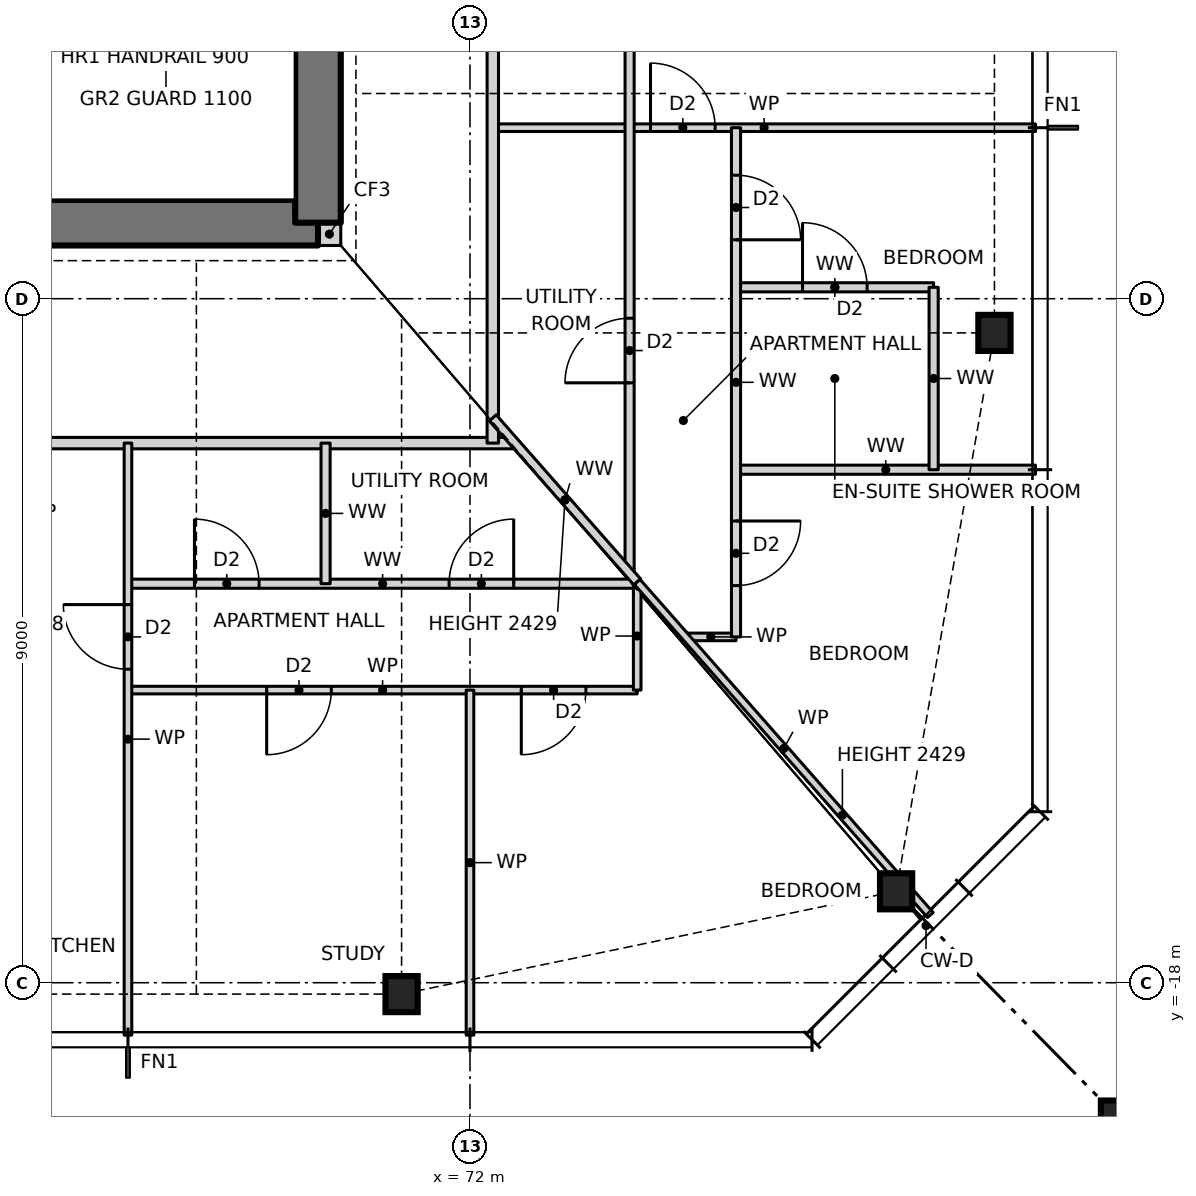
"""IFC4 building model, lengths in metres.
Left out: names, types, materials, properties, quantities, classifications, styles, units other than length and angle.
Written with IfcOpenShell. Run it as: python <this file> out.ifc"""

import sys

from ifc_helpers import new_model, si_unit, direction, frame, frame_2d, origin, origin_2d, place, context, subcontext, project, spatial, rectangle, hollow_rectangle, i_section, extrude, element, fill, save


model = new_model("IFC4")
c1 = context("Model", 3, precision=1e-05, world=origin(), true_north=direction((0.0, 1.0)))
c2 = subcontext(c1, "Body", "Model", "MODEL_VIEW")
j1 = project(units=[si_unit("LENGTHUNIT", "METRE"), si_unit("PLANEANGLEUNIT", "RADIAN")], contexts=[c1])
p1 = place(None, origin())
s1 = spatial("IfcSite", under=j1, at=p1, CompositionType="ELEMENT")
p2 = place(p1, origin())
s2 = spatial("IfcBuilding", under=s1, at=p2, CompositionType="ELEMENT")
p3 = place(p2, frame((0.0, 0.0, 57.0)))
s3 = spatial("IfcBuildingStorey", under=s2, at=p3, CompositionType="ELEMENT", Elevation=57.0)
for number, where, z_axis, x_axis in (
    (1, (71.1, -18.15, 0.0), (0.0, 0.0, 1.0), (1.0, 0.0, 0.0)),
    (2, (77.606, -16.797, 0.0), (0.0, 0.0, 1.0), (1.0, 0.0, 0.0)),
    (3, (78.9, -9.45, 0.0), (0.0, 0.0, 1.0), (1.0, 0.0, 0.0)),
):
    element("IfcColumn", number, at=place(p3, frame(where, z_axis=z_axis, x_axis=x_axis)), inside=s3, PredefinedType="COLUMN", context=c2, shape_type="SweptSolid", body=[
        extrude(i_section(OverallWidth=0.424, OverallDepth=0.475, WebThickness=0.048, FlangeThickness=0.077, at=origin_2d()), origin(), (0.0, 0.0, 1.0), 3.5),
    ])
p4 = place(p3, frame((80.9, -20.15, 0.0), z_axis=(0.0, 0.0, 1.0), x_axis=(1.0, 0.0, 0.0)))
e4 = element("IfcColumn", 4, at=p4, inside=s3, PredefinedType="COLUMN", context=c2, shape_type="SweptSolid", body=[
    extrude(hollow_rectangle(XDim=1.2, YDim=1.2, WallThickness=0.07, at=origin_2d()), origin(), (0.0, 0.0, 1.0), 3.5),
])
p5 = place(p3, frame((70.0, -8.15, 0.0), z_axis=(0.0, 0.0, 1.0), x_axis=(1.0, 0.0, 0.0)))
e5 = element("IfcWall", 5, at=p5, inside=s3, PredefinedType="SOLIDWALL", context=c2, shape_type="SweptSolid", body=[
    extrude(rectangle(XDim=0.3, YDim=0.3, at=frame_2d((0.15, 0.0))), origin(), (0.0, 0.0, 1.0), 3.5),
])
p6 = place(p3, frame((56.0, -8.0, 0.0), z_axis=(0.0, 0.0, 1.0), x_axis=(1.0, 0.0, 0.0)))
e6 = element("IfcWall", 6, at=p6, inside=s3, PredefinedType="SHEAR", context=c2, shape_type="SweptSolid", body=[
    extrude(rectangle(XDim=14.0, YDim=0.6, at=frame_2d((7.0, 0.0))), origin(), (0.0, 0.0, 1.0), 3.5),
])
p7 = place(p6, frame((2.7, 0.0, 0.0)))
e7 = element("IfcOpeningElement", 7, at=p7, cuts=e6, PredefinedType="OPENING", context=c2, shape_type="SweptSolid", body=[
    extrude(rectangle(XDim=0.9, YDim=2.1, at=frame_2d((0.45, 1.05))), frame((0.0, 0.31, 0.0), z_axis=(0.0, -1.0, 0.0), x_axis=(1.0, 0.0, 0.0)), (0.0, 0.0, 1.0), 0.62),
])
p8 = place(p6, frame((7.7, 0.0, 0.0)))
e8 = element("IfcOpeningElement", 8, at=p8, cuts=e6, PredefinedType="OPENING", context=c2, shape_type="SweptSolid", body=[
    extrude(rectangle(XDim=0.9, YDim=2.1, at=frame_2d((0.45, 1.05))), frame((0.0, 0.31, 0.0), z_axis=(0.0, -1.0, 0.0), x_axis=(1.0, 0.0, 0.0)), (0.0, 0.0, 1.0), 0.62),
])
p9 = place(p3, frame((70.0, -8.0, 0.0), z_axis=(0.0, 0.0, 1.0), x_axis=(0.0, 1.0, 0.0)))
e9 = element("IfcWall", 9, at=p9, inside=s3, PredefinedType="SHEAR", context=c2, shape_type="SweptSolid", body=[
    extrude(rectangle(XDim=16.0, YDim=0.6, at=frame_2d((8.0, 0.0))), origin(), (0.0, 0.0, 1.0), 3.5),
])
p10 = place(p9, frame((7.5, 0.0, 0.0)))
e10 = element("IfcOpeningElement", 10, at=p10, cuts=e9, PredefinedType="OPENING", context=c2, shape_type="SweptSolid", body=[
    extrude(rectangle(XDim=1.0, YDim=2.1, at=frame_2d((0.5, 1.05))), frame((0.0, 0.31, 0.0), z_axis=(0.0, -1.0, 0.0), x_axis=(1.0, 0.0, 0.0)), (0.0, 0.0, 1.0), 0.62),
])
p11 = place(p3, frame((67.5, -14.15, 0.0), z_axis=(0.0, 0.0, 1.0), x_axis=(1.0, 0.0, 0.0)))
e11 = element("IfcWall", 11, at=p11, inside=s3, PredefinedType="PARTITIONING", context=c2, shape_type="SweptSolid", body=[
    extrude(rectangle(XDim=6.7, YDim=0.1, at=frame_2d((3.35, 0.0))), origin(), (0.0, 0.0, 1.0), 3.27),
])
p12 = place(p11, frame((1.825, 0.0, 0.0)))
e12 = element("IfcOpeningElement", 12, at=p12, cuts=e11, PredefinedType="OPENING", context=c2, shape_type="SweptSolid", body=[
    extrude(rectangle(XDim=0.85, YDim=2.1, at=frame_2d((0.425, 1.05))), frame((0.0, 0.06, 0.0), z_axis=(0.0, -1.0, 0.0), x_axis=(1.0, 0.0, 0.0)), (0.0, 0.0, 1.0), 0.12),
])
p13 = place(p11, frame((5.175, 0.0, 0.0)))
e13 = element("IfcOpeningElement", 13, at=p13, cuts=e11, PredefinedType="OPENING", context=c2, shape_type="SweptSolid", body=[
    extrude(rectangle(XDim=0.85, YDim=2.1, at=frame_2d((0.425, 1.05))), frame((0.0, 0.06, 0.0), z_axis=(0.0, -1.0, 0.0), x_axis=(1.0, 0.0, 0.0)), (0.0, 0.0, 1.0), 0.12),
])
p14 = place(p3, frame((74.836, -13.45, 0.0), z_axis=(0.0, 0.0, 1.0), x_axis=(1.0, 0.0, 0.0)))
e14 = element("IfcWall", 14, at=p14, inside=s3, PredefinedType="PARTITIONING", context=c2, shape_type="SweptSolid", body=[
    extrude(rectangle(XDim=0.664, YDim=0.1, at=frame_2d((0.332, 0.0))), origin(), (0.0, 0.0, 1.0), 3.27),
])
p15 = place(p3, frame((67.5, -12.75, 0.0), z_axis=(0.0, 0.0, 1.0), x_axis=(1.0, 0.0, 0.0)))
e15 = element("IfcWall", 15, at=p15, inside=s3, PredefinedType="PARTITIONING", context=c2, shape_type="SweptSolid", body=[
    extrude(rectangle(XDim=6.7, YDim=0.12, at=frame_2d((3.35, 0.0))), origin(), (0.0, 0.0, 1.0), 3.27),
])
p16 = place(p15, frame((0.875, 0.0, 0.0)))
e16 = element("IfcOpeningElement", 16, at=p16, cuts=e15, PredefinedType="OPENING", context=c2, shape_type="SweptSolid", body=[
    extrude(rectangle(XDim=0.85, YDim=2.1, at=frame_2d((0.425, 1.05))), frame((0.0, 0.07, 0.0), z_axis=(0.0, -1.0, 0.0), x_axis=(1.0, 0.0, 0.0)), (0.0, 0.0, 1.0), 0.14),
])
p17 = place(p15, frame((4.225, 0.0, 0.0)))
e17 = element("IfcOpeningElement", 17, at=p17, cuts=e15, PredefinedType="OPENING", context=c2, shape_type="SweptSolid", body=[
    extrude(rectangle(XDim=0.85, YDim=2.1, at=frame_2d((0.425, 1.05))), frame((0.0, 0.07, 0.0), z_axis=(0.0, -1.0, 0.0), x_axis=(1.0, 0.0, 0.0)), (0.0, 0.0, 1.0), 0.14),
])
p18 = place(p3, frame((75.5, -11.25, 0.0), z_axis=(0.0, 0.0, 1.0), x_axis=(1.0, 0.0, 0.0)))
e18 = element("IfcWall", 18, at=p18, inside=s3, PredefinedType="PARTITIONING", context=c2, shape_type="SweptSolid", body=[
    extrude(rectangle(XDim=3.94, YDim=0.12, at=frame_2d((1.97, 0.0))), origin(), (0.0, 0.0, 1.0), 3.27),
])
p19 = place(p3, frame((53.408, -10.9, 0.0), z_axis=(0.0, 0.0, 1.0), x_axis=(1.0, 0.0, 0.0)))
e19 = element("IfcWall", 19, at=p19, inside=s3, PredefinedType="PARTITIONING", context=c2, shape_type="SweptSolid", body=[
    extrude(rectangle(XDim=19.184, YDim=0.15, at=frame_2d((9.592, 0.0))), origin(), (0.0, 0.0, 1.0), 3.27),
])
p20 = place(p19, frame((5.092, 0.0, 0.0)))
e20 = element("IfcOpeningElement", 20, at=p20, cuts=e19, PredefinedType="OPENING", context=c2, shape_type="SweptSolid", body=[
    extrude(rectangle(XDim=1.0, YDim=2.1, at=frame_2d((0.5, 1.05))), frame((0.0, 0.085, 0.0), z_axis=(0.0, -1.0, 0.0), x_axis=(1.0, 0.0, 0.0)), (0.0, 0.0, 1.0), 0.17),
])
p21 = place(p19, frame((10.492, 0.0, 0.0)))
e21 = element("IfcOpeningElement", 21, at=p21, cuts=e19, PredefinedType="OPENING", context=c2, shape_type="SweptSolid", body=[
    extrude(rectangle(XDim=1.0, YDim=2.1, at=frame_2d((0.5, 1.05))), frame((0.0, 0.085, 0.0), z_axis=(0.0, -1.0, 0.0), x_axis=(1.0, 0.0, 0.0)), (0.0, 0.0, 1.0), 0.17),
])
p22 = place(p3, frame((75.5, -8.85, 0.0), z_axis=(0.0, 0.0, 1.0), x_axis=(1.0, 0.0, 0.0)))
e22 = element("IfcWall", 22, at=p22, inside=s3, PredefinedType="PARTITIONING", context=c2, shape_type="SweptSolid", body=[
    extrude(rectangle(XDim=2.6, YDim=0.12, at=frame_2d((1.3, 0.0))), origin(), (0.0, 0.0, 1.0), 3.27),
])
p23 = place(p22, frame((0.875, 0.0, 0.0)))
e23 = element("IfcOpeningElement", 23, at=p23, cuts=e22, PredefinedType="OPENING", context=c2, shape_type="SweptSolid", body=[
    extrude(rectangle(XDim=0.85, YDim=2.1, at=frame_2d((0.425, 1.05))), frame((0.0, 0.07, 0.0), z_axis=(0.0, -1.0, 0.0), x_axis=(1.0, 0.0, 0.0)), (0.0, 0.0, 1.0), 0.14),
])
p24 = place(p3, frame((72.3, -6.75, 0.0), z_axis=(0.0, 0.0, 1.0), x_axis=(1.0, 0.0, 0.0)))
e24 = element("IfcWall", 24, at=p24, inside=s3, PredefinedType="PARTITIONING", context=c2, shape_type="SweptSolid", body=[
    extrude(rectangle(XDim=7.14, YDim=0.1, at=frame_2d((3.57, 0.0))), origin(), (0.0, 0.0, 1.0), 3.27),
])
p25 = place(p24, frame((2.075, 0.0, 0.0)))
e25 = element("IfcOpeningElement", 25, at=p25, cuts=e24, PredefinedType="OPENING", context=c2, shape_type="SweptSolid", body=[
    extrude(rectangle(XDim=0.85, YDim=2.1, at=frame_2d((0.425, 1.05))), frame((0.0, 0.06, 0.0), z_axis=(0.0, -1.0, 0.0), x_axis=(1.0, 0.0, 0.0)), (0.0, 0.0, 1.0), 0.12),
])
p26 = place(p3, frame((78.1, -11.25, 0.0), z_axis=(0.0, 0.0, 1.0), x_axis=(0.0, 1.0, 0.0)))
e26 = element("IfcWall", 26, at=p26, inside=s3, PredefinedType="PARTITIONING", context=c2, shape_type="SweptSolid", body=[
    extrude(rectangle(XDim=2.4, YDim=0.12, at=frame_2d((1.2, 0.0))), origin(), (0.0, 0.0, 1.0), 3.27),
])
p27 = place(p3, frame((75.5, -13.45, 0.0), z_axis=(0.0, 0.0, 1.0), x_axis=(0.0, 1.0, 0.0)))
e27 = element("IfcWall", 27, at=p27, inside=s3, PredefinedType="PARTITIONING", context=c2, shape_type="SweptSolid", body=[
    extrude(rectangle(XDim=6.7, YDim=0.12, at=frame_2d((3.35, 0.0))), origin(), (0.0, 0.0, 1.0), 3.27),
])
p28 = place(p27, frame((5.225, 0.0, 0.0)))
e28 = element("IfcOpeningElement", 28, at=p28, cuts=e27, PredefinedType="OPENING", context=c2, shape_type="SweptSolid", body=[
    extrude(rectangle(XDim=0.85, YDim=2.1, at=frame_2d((0.425, 1.05))), frame((0.0, 0.07, 0.0), z_axis=(0.0, -1.0, 0.0), x_axis=(1.0, 0.0, 0.0)), (0.0, 0.0, 1.0), 0.14),
])
p29 = place(p27, frame((0.675, 0.0, 0.0)))
e29 = element("IfcOpeningElement", 29, at=p29, cuts=e27, PredefinedType="OPENING", context=c2, shape_type="SweptSolid", body=[
    extrude(rectangle(XDim=0.85, YDim=2.1, at=frame_2d((0.425, 1.05))), frame((0.0, 0.07, 0.0), z_axis=(0.0, -1.0, 0.0), x_axis=(1.0, 0.0, 0.0)), (0.0, 0.0, 1.0), 0.14),
])
p30 = place(p3, frame((74.2, -14.15, 0.0), z_axis=(0.0, 0.0, 1.0), x_axis=(0.0, 1.0, 0.0)))
e30 = element("IfcWall", 30, at=p30, inside=s3, PredefinedType="PARTITIONING", context=c2, shape_type="SweptSolid", body=[
    extrude(rectangle(XDim=1.423, YDim=0.1, at=frame_2d((0.711, 0.0))), origin(), (0.0, 0.0, 1.0), 3.27),
])
p31 = place(p3, frame((74.1, -12.614, 0.0), z_axis=(0.0, 0.0, 1.0), x_axis=(0.0, 1.0, 0.0)))
e31 = element("IfcWall", 31, at=p31, inside=s3, PredefinedType="PARTITIONING", context=c2, shape_type="SweptSolid", body=[
    extrude(rectangle(XDim=25.228, YDim=0.12, at=frame_2d((12.614, 0.0))), origin(), (0.0, 0.0, 1.0), 3.27),
])
p32 = place(p31, frame((7.239, 0.0, 0.0)))
e32 = element("IfcOpeningElement", 32, at=p32, cuts=e31, PredefinedType="OPENING", context=c2, shape_type="SweptSolid", body=[
    extrude(rectangle(XDim=0.85, YDim=2.1, at=frame_2d((0.425, 1.05))), frame((0.0, 0.07, 0.0), z_axis=(0.0, -1.0, 0.0), x_axis=(1.0, 0.0, 0.0)), (0.0, 0.0, 1.0), 0.14),
])
p33 = place(p31, frame((10.439, 0.0, 0.0)))
e33 = element("IfcOpeningElement", 33, at=p33, cuts=e31, PredefinedType="OPENING", context=c2, shape_type="SweptSolid", body=[
    extrude(rectangle(XDim=0.85, YDim=2.1, at=frame_2d((0.425, 1.05))), frame((0.0, 0.07, 0.0), z_axis=(0.0, -1.0, 0.0), x_axis=(1.0, 0.0, 0.0)), (0.0, 0.0, 1.0), 0.14),
])
p34 = place(p31, frame((2.507, 0.0, 0.0)))
e34 = element("IfcOpeningElement", 34, at=p34, cuts=e31, PredefinedType="OPENING", context=c2, shape_type="SweptSolid", body=[
    extrude(rectangle(XDim=0.85, YDim=2.1, at=frame_2d((0.425, 1.05))), frame((0.0, 0.07, 0.0), z_axis=(0.0, -1.0, 0.0), x_axis=(1.0, 0.0, 0.0)), (0.0, 0.0, 1.0), 0.14),
])
p35 = place(p31, frame((16.639, 0.0, 0.0)))
e35 = element("IfcOpeningElement", 35, at=p35, cuts=e31, PredefinedType="OPENING", context=c2, shape_type="SweptSolid", body=[
    extrude(rectangle(XDim=0.85, YDim=2.1, at=frame_2d((0.425, 1.05))), frame((0.0, 0.07, 0.0), z_axis=(0.0, -1.0, 0.0), x_axis=(1.0, 0.0, 0.0)), (0.0, 0.0, 1.0), 0.14),
])
p36 = place(p31, frame((21.821, 0.0, 0.0)))
e36 = element("IfcOpeningElement", 36, at=p36, cuts=e31, PredefinedType="OPENING", context=c2, shape_type="SweptSolid", body=[
    extrude(rectangle(XDim=0.85, YDim=2.1, at=frame_2d((0.425, 1.05))), frame((0.0, 0.07, 0.0), z_axis=(0.0, -1.0, 0.0), x_axis=(1.0, 0.0, 0.0)), (0.0, 0.0, 1.0), 0.14),
])
p37 = place(p3, frame((72.3, -10.9, 0.0), z_axis=(0.0, 0.0, 1.0), x_axis=(0.0, 1.0, 0.0)))
e37 = element("IfcWall", 37, at=p37, inside=s3, PredefinedType="PARTITIONING", context=c2, shape_type="SweptSolid", body=[
    extrude(rectangle(XDim=21.468, YDim=0.15, at=frame_2d((10.734, 0.0))), origin(), (0.0, 0.0, 1.0), 3.27),
])
p38 = place(p37, frame((8.65, 0.0, 0.0)))
e38 = element("IfcOpeningElement", 38, at=p38, cuts=e37, PredefinedType="OPENING", context=c2, shape_type="SweptSolid", body=[
    extrude(rectangle(XDim=1.0, YDim=2.1, at=frame_2d((0.5, 1.05))), frame((0.0, 0.085, 0.0), z_axis=(0.0, -1.0, 0.0), x_axis=(1.0, 0.0, 0.0)), (0.0, 0.0, 1.0), 0.17),
])
p39 = place(p3, frame((72.0, -18.69, 0.0), z_axis=(0.0, 0.0, 1.0), x_axis=(0.0, 1.0, 0.0)))
e39 = element("IfcWall", 39, at=p39, inside=s3, PredefinedType="PARTITIONING", context=c2, shape_type="SweptSolid", body=[
    extrude(rectangle(XDim=4.54, YDim=0.1, at=frame_2d((2.27, 0.0))), origin(), (0.0, 0.0, 1.0), 3.27),
])
p40 = place(p3, frame((70.1, -12.75, 0.0), z_axis=(0.0, 0.0, 1.0), x_axis=(0.0, 1.0, 0.0)))
e40 = element("IfcWall", 40, at=p40, inside=s3, PredefinedType="PARTITIONING", context=c2, shape_type="SweptSolid", body=[
    extrude(rectangle(XDim=1.85, YDim=0.12, at=frame_2d((0.925, 0.0))), origin(), (0.0, 0.0, 1.0), 3.27),
])
p41 = place(p3, frame((67.5, -18.69, 0.0), z_axis=(0.0, 0.0, 1.0), x_axis=(0.0, 1.0, 0.0)))
e41 = element("IfcWall", 41, at=p41, inside=s3, PredefinedType="PARTITIONING", context=c2, shape_type="SweptSolid", body=[
    extrude(rectangle(XDim=7.79, YDim=0.1, at=frame_2d((3.895, 0.0))), origin(), (0.0, 0.0, 1.0), 3.27),
])
p42 = place(p41, frame((4.815, 0.0, 0.0)))
e42 = element("IfcOpeningElement", 42, at=p42, cuts=e41, PredefinedType="OPENING", context=c2, shape_type="SweptSolid", body=[
    extrude(rectangle(XDim=0.85, YDim=2.1, at=frame_2d((0.425, 1.05))), frame((0.0, 0.06, 0.0), z_axis=(0.0, -1.0, 0.0), x_axis=(1.0, 0.0, 0.0)), (0.0, 0.0, 1.0), 0.12),
])
p43 = place(p3, frame((74.2, -12.727, 0.0), z_axis=(0.0, 0.0, 1.0), x_axis=(-0.66059344937, 0.75074382758, 0.0)))
e43 = element("IfcWall", 43, at=p43, inside=s3, PredefinedType="PARTITIONING", context=c2, shape_type="SweptSolid", body=[
    extrude(rectangle(XDim=2.876, YDim=0.12, at=frame_2d((1.438, 0.0))), origin(), (0.0, 0.0, 1.0), 2.429),
])
p44 = place(p3, frame((78.057, -17.109, 0.0), z_axis=(0.0, 0.0, 1.0), x_axis=(-0.660654290516, 0.750690287951, 0.0)))
e44 = element("IfcWall", 44, at=p44, inside=s3, PredefinedType="PARTITIONING", context=c2, shape_type="SweptSolid", body=[
    extrude(rectangle(XDim=5.838, YDim=0.1, at=frame_2d((2.919, 0.0))), origin(), (0.0, 0.0, 1.0), 2.429),
])
p45 = place(p42, origin())
e45 = element("IfcDoor", 45, at=p45, inside=s3, OperationType="SINGLE_SWING_RIGHT", PredefinedType="DOOR", context=c2, shape_type="SweptSolid", body=[
    extrude(rectangle(XDim=0.85, YDim=2.1, at=frame_2d((0.425, 1.05))), frame((0.0, 0.025, 0.0), z_axis=(0.0, -1.0, 0.0), x_axis=(1.0, 0.0, 0.0)), (0.0, 0.0, 1.0), 0.05),
])
fill(e42, e45)
p46 = place(p12, frame((0.85, 0.0, 0.0), z_axis=(0.0, 0.0, 1.0), x_axis=(-1.0, 0.0, 0.0)))
e46 = element("IfcDoor", 46, at=p46, inside=s3, OperationType="SINGLE_SWING_RIGHT", PredefinedType="DOOR", context=c2, shape_type="SweptSolid", body=[
    extrude(rectangle(XDim=0.85, YDim=2.1, at=frame_2d((0.425, 1.05))), frame((0.0, 0.025, 0.0), z_axis=(0.0, -1.0, 0.0), x_axis=(1.0, 0.0, 0.0)), (0.0, 0.0, 1.0), 0.05),
])
fill(e12, e46)
p47 = place(p13, frame((0.85, 0.0, 0.0), z_axis=(0.0, 0.0, 1.0), x_axis=(-1.0, 0.0, 0.0)))
e47 = element("IfcDoor", 47, at=p47, inside=s3, OperationType="SINGLE_SWING_RIGHT", PredefinedType="DOOR", context=c2, shape_type="SweptSolid", body=[
    extrude(rectangle(XDim=0.85, YDim=2.1, at=frame_2d((0.425, 1.05))), frame((0.0, 0.025, 0.0), z_axis=(0.0, -1.0, 0.0), x_axis=(1.0, 0.0, 0.0)), (0.0, 0.0, 1.0), 0.05),
])
fill(e13, e47)
p48 = place(p16, origin())
e48 = element("IfcDoor", 48, at=p48, inside=s3, OperationType="SINGLE_SWING_LEFT", PredefinedType="DOOR", context=c2, shape_type="SweptSolid", body=[
    extrude(rectangle(XDim=0.85, YDim=2.1, at=frame_2d((0.425, 1.05))), frame((0.0, 0.025, 0.0), z_axis=(0.0, -1.0, 0.0), x_axis=(1.0, 0.0, 0.0)), (0.0, 0.0, 1.0), 0.05),
])
fill(e16, e48)
p49 = place(p17, origin())
e49 = element("IfcDoor", 49, at=p49, inside=s3, OperationType="SINGLE_SWING_RIGHT", PredefinedType="DOOR", context=c2, shape_type="SweptSolid", body=[
    extrude(rectangle(XDim=0.85, YDim=2.1, at=frame_2d((0.425, 1.05))), frame((0.0, 0.025, 0.0), z_axis=(0.0, -1.0, 0.0), x_axis=(1.0, 0.0, 0.0)), (0.0, 0.0, 1.0), 0.05),
])
fill(e17, e49)
p50 = place(p25, origin())
e50 = element("IfcDoor", 50, at=p50, inside=s3, OperationType="SINGLE_SWING_LEFT", PredefinedType="DOOR", context=c2, shape_type="SweptSolid", body=[
    extrude(rectangle(XDim=0.85, YDim=2.1, at=frame_2d((0.425, 1.05))), frame((0.0, 0.025, 0.0), z_axis=(0.0, -1.0, 0.0), x_axis=(1.0, 0.0, 0.0)), (0.0, 0.0, 1.0), 0.05),
])
fill(e25, e50)
p51 = place(p23, origin())
e51 = element("IfcDoor", 51, at=p51, inside=s3, OperationType="SINGLE_SWING_LEFT", PredefinedType="DOOR", context=c2, shape_type="SweptSolid", body=[
    extrude(rectangle(XDim=0.85, YDim=2.1, at=frame_2d((0.425, 1.05))), frame((0.0, 0.025, 0.0), z_axis=(0.0, -1.0, 0.0), x_axis=(1.0, 0.0, 0.0)), (0.0, 0.0, 1.0), 0.05),
])
fill(e23, e51)
p52 = place(p28, frame((0.85, 0.0, 0.0), z_axis=(0.0, 0.0, 1.0), x_axis=(-1.0, 0.0, 0.0)))
e52 = element("IfcDoor", 52, at=p52, inside=s3, OperationType="SINGLE_SWING_RIGHT", PredefinedType="DOOR", context=c2, shape_type="SweptSolid", body=[
    extrude(rectangle(XDim=0.85, YDim=2.1, at=frame_2d((0.425, 1.05))), frame((0.0, 0.025, 0.0), z_axis=(0.0, -1.0, 0.0), x_axis=(1.0, 0.0, 0.0)), (0.0, 0.0, 1.0), 0.05),
])
fill(e28, e52)
p53 = place(p29, frame((0.85, 0.0, 0.0), z_axis=(0.0, 0.0, 1.0), x_axis=(-1.0, 0.0, 0.0)))
e53 = element("IfcDoor", 53, at=p53, inside=s3, OperationType="SINGLE_SWING_LEFT", PredefinedType="DOOR", context=c2, shape_type="SweptSolid", body=[
    extrude(rectangle(XDim=0.85, YDim=2.1, at=frame_2d((0.425, 1.05))), frame((0.0, 0.025, 0.0), z_axis=(0.0, -1.0, 0.0), x_axis=(1.0, 0.0, 0.0)), (0.0, 0.0, 1.0), 0.05),
])
fill(e29, e53)
p54 = place(p34, origin())
e54 = element("IfcDoor", 54, at=p54, inside=s3, OperationType="SINGLE_SWING_LEFT", PredefinedType="DOOR", context=c2, shape_type="SweptSolid", body=[
    extrude(rectangle(XDim=0.85, YDim=2.1, at=frame_2d((0.425, 1.05))), frame((0.0, 0.025, 0.0), z_axis=(0.0, -1.0, 0.0), x_axis=(1.0, 0.0, 0.0)), (0.0, 0.0, 1.0), 0.05),
])
fill(e34, e54)
save(model, sys.argv[1])
